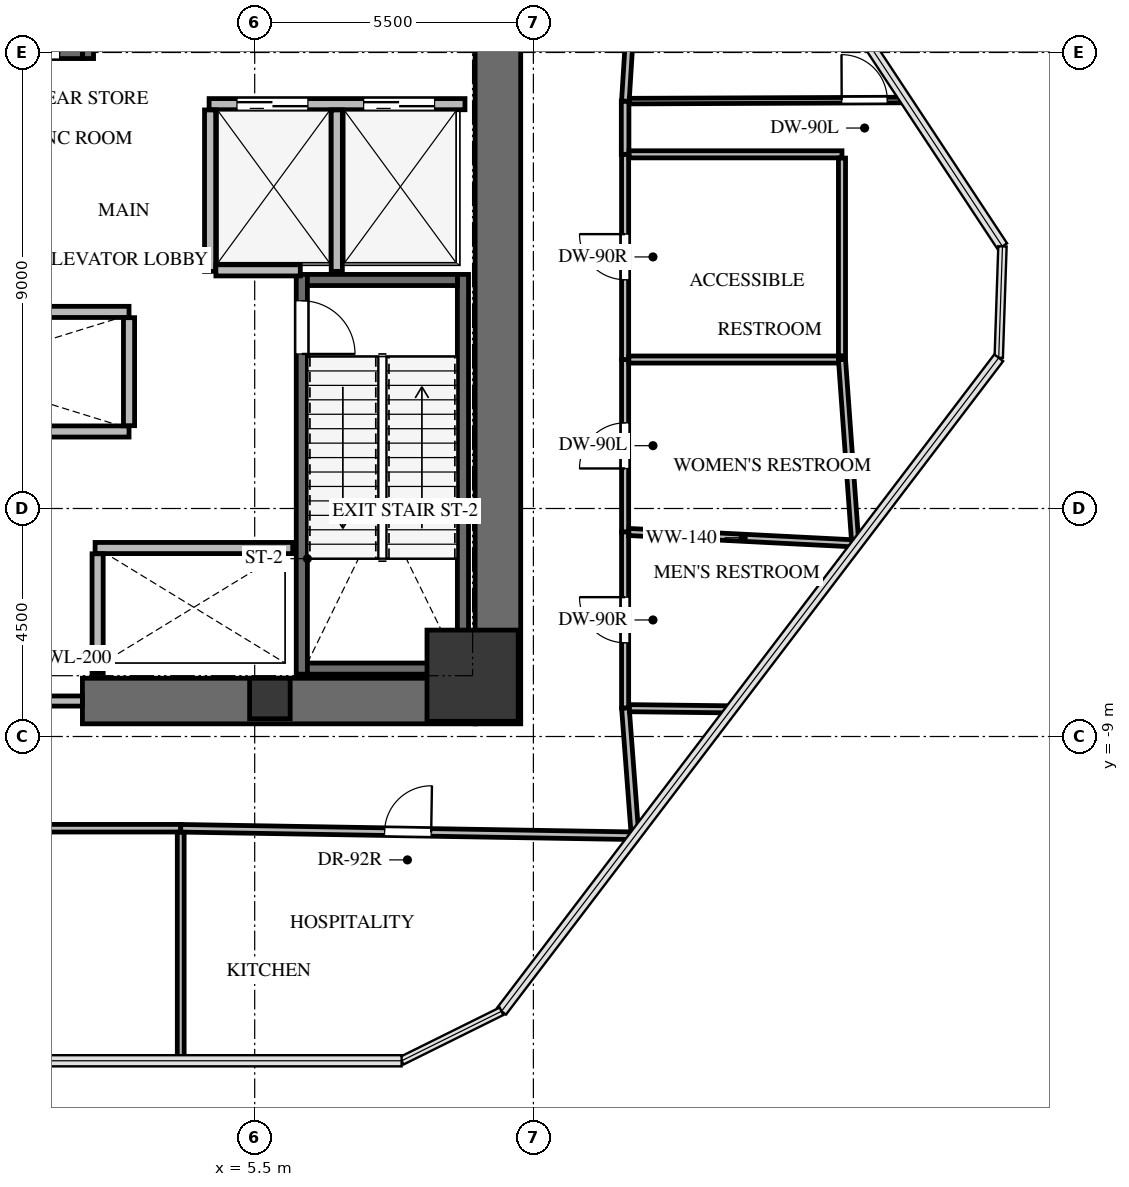
"""IFC4 building model, lengths in metres.
Left out: names, types, materials, properties, quantities, classifications, styles, units other than length and angle.
Written with IfcOpenShell. Run it as: python <this file> out.ifc"""

import sys

from ifc_helpers import new_model, si_unit, direction, frame, frame_2d, origin, origin_2d, place, context, subcontext, project, spatial, rectangle, extrude, source, transform, mapped, element, fill, save


model = new_model("IFC4")
c1 = context("Model", 3, precision=1e-05, world=origin(), true_north=direction((0.0, 1.0)))
c2 = subcontext(c1, "Body", "Model", "MODEL_VIEW")
j1 = project(units=[si_unit("LENGTHUNIT", "METRE"), si_unit("PLANEANGLEUNIT", "RADIAN")], contexts=[c1])
p1 = place(None, origin())
s1 = spatial("IfcSite", under=j1, at=p1, CompositionType="ELEMENT")
p2 = place(p1, origin())
s2 = spatial("IfcBuilding", under=s1, at=p2, CompositionType="ELEMENT")
p3 = place(p2, frame((0.0, 0.0, 5.2)))
s3 = spatial("IfcBuildingStorey", under=s2, at=p3, CompositionType="ELEMENT", Elevation=5.2)
p4 = place(p3, frame((10.3, -8.75, 0.0), z_axis=(0.0, 0.0, 1.0), x_axis=(0.0, 1.0, 0.0)))
e1 = element("IfcWall", 1, at=p4, inside=s3, PredefinedType="SHEAR", context=c2, shape_type="SweptSolid", body=[
    extrude(rectangle(XDim=17.5, YDim=0.9, at=frame_2d((8.75, 0.0))), origin(), (0.0, 0.0, 1.0), 5.2),
])
p5 = place(p3, frame((2.1, -8.3, 0.0), z_axis=(0.0, 0.0, 1.0), x_axis=(1.0, 0.0, 0.0)))
e2 = element("IfcWall", 2, at=p5, inside=s3, PredefinedType="SHEAR", context=c2, shape_type="SweptSolid", body=[
    extrude(rectangle(XDim=7.75, YDim=0.9, at=frame_2d((3.875, 0.0))), origin(), (0.0, 0.0, 1.0), 5.2),
])
p6 = place(p3, frame((9.61, -7.77, -0.3), z_axis=(0.0, 0.0, 1.0), x_axis=(0.0, 1.0, 0.0)))
e3 = element("IfcWall", 3, at=p6, inside=s3, PredefinedType="SHEAR", context=c2, shape_type="SweptSolid", body=[
    extrude(rectangle(XDim=7.89, YDim=0.22, at=frame_2d((3.945, 0.0))), origin(), (0.0, 0.0, 1.0), 5.15),
])
p7 = place(p3, frame((6.43, 0.12, -0.3), z_axis=(0.0, 0.0, 1.0), x_axis=(0.0, -1.0, 0.0)))
e4 = element("IfcWall", 4, at=p7, inside=s3, PredefinedType="SHEAR", context=c2, shape_type="SweptSolid", body=[
    extrude(rectangle(XDim=7.89, YDim=0.22, at=frame_2d((3.945, 0.0))), origin(), (0.0, 0.0, 1.0), 5.15),
])
p8 = place(p7, frame((0.52, 0.0, 0.0)))
e5 = element("IfcOpeningElement", 5, at=p8, cuts=e4, PredefinedType="OPENING", context=c2, shape_type="SweptSolid", body=[
    extrude(rectangle(XDim=1.05, YDim=2.15, at=frame_2d((0.525, 1.075))), frame((0.0, 0.12, 0.0), z_axis=(0.0, -1.0, 0.0), x_axis=(1.0, 0.0, 0.0)), (0.0, 0.0, 1.0), 0.24),
])
for number, where, z_axis, x_axis in (
    (6, (6.54, -7.66, -0.3), (0.0, 0.0, 1.0), (1.0, 0.0, 0.0)),
    (7, (9.5, 0.01, -0.3), (0.0, 0.0, 1.0), (-1.0, 0.0, 0.0)),
):
    element("IfcWall", number, at=place(p3, frame(where, z_axis=z_axis, x_axis=x_axis)), inside=s3, PredefinedType="SHEAR", context=c2, shape_type="SweptSolid", body=[
        extrude(rectangle(XDim=2.96, YDim=0.22, at=frame_2d((1.48, 0.0))), origin(), (0.0, 0.0, 1.0), 5.15),
    ])
p9 = place(p3, frame((2.21, 4.38, -0.3), z_axis=(0.0, 0.0, 1.0), x_axis=(0.0, 1.0, 0.0)))
e8 = element("IfcWall", 8, at=p9, inside=s3, PredefinedType="SHEAR", context=c2, shape_type="SweptSolid", body=[
    extrude(rectangle(XDim=3.4, YDim=0.22, at=frame_2d((1.7, 0.0))), origin(), (0.0, 0.0, 1.0), 5.15),
])
p10 = place(p3, frame((-5.25, 4.49, -0.3), z_axis=(0.0, 0.0, 1.0), x_axis=(1.0, 0.0, 0.0)))
e9 = element("IfcWall", 9, at=p10, inside=s3, PredefinedType="SHEAR", context=c2, shape_type="SweptSolid", body=[
    extrude(rectangle(XDim=7.35, YDim=0.22, at=frame_2d((3.675, 0.0))), origin(), (0.0, 0.0, 1.0), 5.15),
])
p11 = place(p10, frame((5.85, 0.0, 0.0)))
e10 = element("IfcOpeningElement", 10, at=p11, cuts=e9, PredefinedType="OPENING", context=c2, shape_type="SweptSolid", body=[
    extrude(rectangle(XDim=1.05, YDim=2.15, at=frame_2d((0.525, 1.075))), frame((0.0, 0.12, 0.0), z_axis=(0.0, -1.0, 0.0), x_axis=(1.0, 0.0, 0.0)), (0.0, 0.0, 1.0), 0.24),
])
m1 = source(origin(), c2, "Body", "SweptSolid", [
    extrude(rectangle(XDim=1.8, YDim=1.8, at=origin_2d()), origin(), (0.0, 0.0, 1.0), 5.15),
])
p12 = place(p3, frame((9.8, -7.8, -0.3), z_axis=(0.0, 0.0, 1.0), x_axis=(1.0, 0.0, 0.0)))
e11 = element("IfcColumn", 11, at=p12, inside=s3, PredefinedType="COLUMN", context=c2, shape_type="MappedRepresentation", body=[
    mapped(m1, transform((0.0, 0.0, 0.0), x_axis=(1.0, 0.0, 0.0), y_axis=(0.0, 1.0, 0.0), z_axis=(0.0, 0.0, 1.0), scale=1.0)),
])
m2 = source(origin(), c2, "Body", "SweptSolid", [
    extrude(rectangle(XDim=0.8, YDim=0.8, at=origin_2d()), origin(), (0.0, 0.0, 1.0), 5.15),
])
p13 = place(p3, frame((5.8, -8.25, -0.3), z_axis=(0.0, 0.0, 1.0), x_axis=(1.0, 0.0, 0.0)))
e12 = element("IfcColumn", 12, at=p13, inside=s3, PredefinedType="PILASTER", context=c2, shape_type="MappedRepresentation", body=[
    mapped(m2, transform((0.0, 0.0, 0.0), x_axis=(1.0, 0.0, 0.0), y_axis=(0.0, 1.0, 0.0), z_axis=(0.0, 0.0, 1.0), scale=1.0)),
])
p14 = place(p3, frame((-2.1, -8.3, 0.0), z_axis=(0.0, 0.0, 1.0), x_axis=(1.0, 0.0, 0.0)))
e13 = element("IfcWall", 13, at=p14, inside=s3, PredefinedType="SOLIDWALL", context=c2, shape_type="SweptSolid", body=[
    extrude(rectangle(XDim=4.2, YDim=0.2, at=frame_2d((2.1, 0.0))), origin(), (0.0, 0.0, 1.0), 4.835),
])
p15 = place(p14, frame((1.2, 0.0, 0.0)))
e14 = element("IfcOpeningElement", 14, at=p15, cuts=e13, PredefinedType="OPENING", context=c2, shape_type="SweptSolid", body=[
    extrude(rectangle(XDim=1.8, YDim=2.15, at=frame_2d((0.9, 1.075))), frame((0.0, 0.11, 0.0), z_axis=(0.0, -1.0, 0.0), x_axis=(1.0, 0.0, 0.0)), (0.0, 0.0, 1.0), 0.22),
])
p16 = place(p3, frame((4.6, 3.48, 0.0), z_axis=(0.0, 0.0, 1.0), x_axis=(1.0, 0.0, 0.0)))
e15 = element("IfcWall", 15, at=p16, inside=s3, PredefinedType="SOLIDWALL", context=c2, shape_type="SweptSolid", body=[
    extrude(rectangle(XDim=5.05, YDim=0.22, at=frame_2d((2.525, 0.0))), origin(), (0.0, 0.0, 1.0), 4.835),
])
p17 = place(p16, frame((0.55, 0.0, 0.0)))
e16 = element("IfcOpeningElement", 16, at=p17, cuts=e15, PredefinedType="OPENING", context=c2, shape_type="SweptSolid", body=[
    extrude(rectangle(XDim=1.4, YDim=2.15, at=frame_2d((0.7, 1.075))), frame((0.0, 0.12, 0.0), z_axis=(0.0, -1.0, 0.0), x_axis=(1.0, 0.0, 0.0)), (0.0, 0.0, 1.0), 0.24),
])
p18 = place(p16, frame((3.05, 0.0, 0.0)))
e17 = element("IfcOpeningElement", 17, at=p18, cuts=e15, PredefinedType="OPENING", context=c2, shape_type="SweptSolid", body=[
    extrude(rectangle(XDim=1.4, YDim=2.15, at=frame_2d((0.7, 1.075))), frame((0.0, 0.12, 0.0), z_axis=(0.0, -1.0, 0.0), x_axis=(1.0, 0.0, 0.0)), (0.0, 0.0, 1.0), 0.24),
])
for number, where, z_axis, x_axis in (
    (18, (4.62, 0.18, 0.0), (0.0, 0.0, 1.0), (0.0, 1.0, 0.0)),
    (19, (7.12, 0.18, 0.0), (0.0, 0.0, 1.0), (0.0, 1.0, 0.0)),
):
    element("IfcWall", number, at=place(p3, frame(where, z_axis=z_axis, x_axis=x_axis)), inside=s3, PredefinedType="SOLIDWALL", context=c2, shape_type="SweptSolid", body=[
        extrude(rectangle(XDim=3.186, YDim=0.22, at=frame_2d((1.593, 0.0))), origin(), (0.0, 0.0, 1.0), 4.835),
    ])
p19 = place(p3, frame((4.734, 0.2, 0.0), z_axis=(0.0, 0.0, 1.0), x_axis=(1.0, 0.0, 0.0)))
e20 = element("IfcWall", 20, at=p19, inside=s3, PredefinedType="SOLIDWALL", context=c2, shape_type="SweptSolid", body=[
    extrude(rectangle(XDim=1.666, YDim=0.22, at=frame_2d((0.833, 0.0))), origin(), (0.0, 0.0, 1.0), 4.835),
])
p20 = place(p3, frame((2.35, -5.28, 0.0), z_axis=(0.0, 0.0, 1.0), x_axis=(1.0, 0.0, 0.0)))
e21 = element("IfcWall", 21, at=p20, inside=s3, PredefinedType="SOLIDWALL", context=c2, shape_type="SweptSolid", body=[
    extrude(rectangle(XDim=3.9, YDim=0.22, at=frame_2d((1.95, 0.0))), origin(), (0.0, 0.0, 1.0), 4.835),
])
p21 = place(p3, frame((2.4, -7.75, 0.0), z_axis=(0.0, 0.0, 1.0), x_axis=(0.0, 1.0, 0.0)))
e22 = element("IfcWall", 22, at=p21, inside=s3, PredefinedType="SOLIDWALL", context=c2, shape_type="SweptSolid", body=[
    extrude(rectangle(XDim=2.356, YDim=0.22, at=frame_2d((1.178, 0.0))), origin(), (0.0, 0.0, 1.0), 4.835),
])
for number, where, z_axis, x_axis in (
    (23, (-4.22, -2.98, 0.0), (0.0, 0.0, 1.0), (1.0, 0.0, 0.0)),
    (24, (-4.22, -0.62, 0.0), (0.0, 0.0, 1.0), (1.0, 0.0, 0.0)),
):
    element("IfcWall", number, at=place(p3, frame(where, z_axis=z_axis, x_axis=x_axis)), inside=s3, PredefinedType="SOLIDWALL", context=c2, shape_type="SweptSolid", body=[
        extrude(rectangle(XDim=7.24, YDim=0.22, at=frame_2d((3.62, 0.0))), origin(), (0.0, 0.0, 1.0), 4.835),
    ])
p22 = place(p3, frame((3.02, -2.866, 0.0), z_axis=(0.0, 0.0, 1.0), x_axis=(0.0, 1.0, 0.0)))
e25 = element("IfcWall", 25, at=p22, inside=s3, PredefinedType="SOLIDWALL", context=c2, shape_type="SweptSolid", body=[
    extrude(rectangle(XDim=2.132, YDim=0.22, at=frame_2d((1.066, 0.0))), origin(), (0.0, 0.0, 1.0), 4.835),
])
p23 = place(p3, frame((12.81, -8.44, 0.0), z_axis=(0.0, 0.0, 1.0), x_axis=(0.0, 1.0, 0.0)))
e26 = element("IfcWall", 26, at=p23, inside=s3, PredefinedType="PARTITIONING", context=c2, shape_type="SweptSolid", body=[
    extrude(rectangle(XDim=3.48, YDim=0.14, at=frame_2d((1.74, 0.0))), origin(), (0.0, 0.0, 1.0), 4.835),
])
p24 = place(p23, frame((1.29, 0.0, 0.0)))
e27 = element("IfcOpeningElement", 27, at=p24, cuts=e26, PredefinedType="OPENING", context=c2, shape_type="SweptSolid", body=[
    extrude(rectangle(XDim=0.9, YDim=2.05, at=frame_2d((0.45, 1.025))), frame((0.0, 0.08, 0.0), z_axis=(0.0, -1.0, 0.0), x_axis=(1.0, 0.0, 0.0)), (0.0, 0.0, 1.0), 0.16),
])
p25 = place(p3, frame((12.81, -4.96, 0.0), z_axis=(0.0, 0.0, 1.0), x_axis=(0.0, 1.0, 0.0)))
e28 = element("IfcWall", 28, at=p25, inside=s3, PredefinedType="PARTITIONING", context=c2, shape_type="SweptSolid", body=[
    extrude(rectangle(XDim=3.4, YDim=0.14, at=frame_2d((1.7, 0.0))), origin(), (0.0, 0.0, 1.0), 3.757),
])
p26 = place(p25, frame((1.25, 0.0, 0.0)))
e29 = element("IfcOpeningElement", 29, at=p26, cuts=e28, PredefinedType="OPENING", context=c2, shape_type="SweptSolid", body=[
    extrude(rectangle(XDim=0.9, YDim=2.05, at=frame_2d((0.45, 1.025))), frame((0.0, 0.08, 0.0), z_axis=(0.0, -1.0, 0.0), x_axis=(1.0, 0.0, 0.0)), (0.0, 0.0, 1.0), 0.16),
])
p27 = place(p3, frame((12.81, -1.56, 0.0), z_axis=(0.0, 0.0, 1.0), x_axis=(0.0, 1.0, 0.0)))
e30 = element("IfcWall", 30, at=p27, inside=s3, PredefinedType="PARTITIONING", context=c2, shape_type="SweptSolid", body=[
    extrude(rectangle(XDim=4.05, YDim=0.14, at=frame_2d((2.025, 0.0))), origin(), (0.0, 0.0, 1.0), 3.757),
])
p28 = place(p27, frame((1.575, 0.0, 0.0)))
e31 = element("IfcOpeningElement", 31, at=p28, cuts=e30, PredefinedType="OPENING", context=c2, shape_type="SweptSolid", body=[
    extrude(rectangle(XDim=0.9, YDim=2.05, at=frame_2d((0.45, 1.025))), frame((0.0, 0.08, 0.0), z_axis=(0.0, -1.0, 0.0), x_axis=(1.0, 0.0, 0.0)), (0.0, 0.0, 1.0), 0.16),
])
p29 = place(p3, frame((-5.96, -10.81, 0.0), z_axis=(0.0, 0.0, 1.0), x_axis=(1.0, 0.0, 0.0)))
e32 = element("IfcWall", 32, at=p29, inside=s3, PredefinedType="PARTITIONING", context=c2, shape_type="SweptSolid", body=[
    extrude(rectangle(XDim=10.0, YDim=0.15, at=frame_2d((5.0, 0.0))), origin(), (0.0, 0.0, 1.0), 3.757),
])
p30 = place(p29, frame((4.525, 0.0, 0.0)))
e33 = element("IfcOpeningElement", 33, at=p30, cuts=e32, PredefinedType="OPENING", context=c2, shape_type="SweptSolid", body=[
    extrude(rectangle(XDim=0.95, YDim=2.1, at=frame_2d((0.475, 1.05))), frame((0.0, 0.085, 0.0), z_axis=(0.0, -1.0, 0.0), x_axis=(1.0, 0.0, 0.0)), (0.0, 0.0, 1.0), 0.17),
])
p31 = place(p3, frame((4.04, -10.811, 0.0), z_axis=(0.0, 0.0, 1.0), x_axis=(0.999863885947, -0.016498775082, 0.0)))
e34 = element("IfcWall", 34, at=p31, inside=s3, PredefinedType="PARTITIONING", context=c2, shape_type="SweptSolid", body=[
    extrude(rectangle(XDim=8.967, YDim=0.15, at=frame_2d((4.484, 0.0))), origin(), (0.0, 0.0, 1.0), 3.757),
])
p32 = place(p31, frame((4.024, 0.0, 0.0)))
e35 = element("IfcOpeningElement", 35, at=p32, cuts=e34, PredefinedType="OPENING", context=c2, shape_type="SweptSolid", body=[
    extrude(rectangle(XDim=0.92, YDim=2.1, at=frame_2d((0.46, 1.05))), frame((0.0, 0.085, 0.0), z_axis=(0.0, -1.0, 0.0), x_axis=(1.0, 0.0, 0.0)), (0.0, 0.0, 1.0), 0.17),
])
p33 = place(p3, frame((13.0, -10.88, 0.0), z_axis=(0.0, 0.0, 1.0), x_axis=(-0.075223978352, 0.99716666264, 0.0)))
e36 = element("IfcWall", 36, at=p33, inside=s3, PredefinedType="PARTITIONING", context=c2, shape_type="SweptSolid", body=[
    extrude(rectangle(XDim=2.447, YDim=0.15, at=frame_2d((1.224, 0.0))), origin(), (0.0, 0.0, 1.0), 4.835),
])
p34 = place(p3, frame((12.81, 2.49, 0.0), z_axis=(0.0, 0.0, 1.0), x_axis=(0.0, 1.0, 0.0)))
e37 = element("IfcWall", 37, at=p34, inside=s3, PredefinedType="PARTITIONING", context=c2, shape_type="SweptSolid", body=[
    extrude(rectangle(XDim=1.05, YDim=0.15, at=frame_2d((0.525, 0.0))), origin(), (0.0, 0.0, 1.0), 4.835),
])
p35 = place(p3, frame((12.815, 3.54, 0.0), z_axis=(0.0, 0.0, 1.0), x_axis=(0.062817309995, 0.998025042554, 0.0)))
e38 = element("IfcWall", 38, at=p35, inside=s3, PredefinedType="PARTITIONING", context=c2, shape_type="SweptSolid", body=[
    extrude(rectangle(XDim=7.513, YDim=0.15, at=frame_2d((3.756, 0.0))), origin(), (0.0, 0.0, 1.0), 4.835),
])
p36 = place(p35, frame((3.296, 0.0, 0.0)))
e39 = element("IfcOpeningElement", 39, at=p36, cuts=e38, PredefinedType="OPENING", context=c2, shape_type="SweptSolid", body=[
    extrude(rectangle(XDim=0.92, YDim=2.1, at=frame_2d((0.46, 1.05))), frame((0.0, 0.085, 0.0), z_axis=(0.0, -1.0, 0.0), x_axis=(1.0, 0.0, 0.0)), (0.0, 0.0, 1.0), 0.17),
])
p37 = place(p3, frame((12.884, -4.964, 0.0), z_axis=(0.0, 0.0, 1.0), x_axis=(0.998724412401, -0.050493049755, 0.0)))
e40 = element("IfcWall", 40, at=p37, inside=s3, PredefinedType="PARTITIONING", context=c2, shape_type="SweptSolid", body=[
    extrude(rectangle(XDim=4.516, YDim=0.14, at=frame_2d((2.258, 0.0))), origin(), (0.0, 0.0, 1.0), 4.835),
])
p38 = place(p3, frame((14.904, -8.464, 0.0), z_axis=(0.0, 0.0, 1.0), x_axis=(-0.999933368486, 0.011543768381, 0.0)))
e41 = element("IfcWall", 41, at=p38, inside=s3, PredefinedType="PARTITIONING", context=c2, shape_type="SweptSolid", body=[
    extrude(rectangle(XDim=2.009, YDim=0.14, at=frame_2d((1.005, 0.0))), origin(), (0.0, 0.0, 1.0), 4.835),
])
p39 = place(p3, frame((17.34, -5.263, 0.0), z_axis=(0.0, 0.0, 1.0), x_axis=(-0.605512507053, -0.795835789471, 0.0)))
e42 = element("IfcWall", 42, at=p39, inside=s3, PredefinedType="PARTITIONING", context=c2, shape_type="SweptSolid", body=[
    extrude(rectangle(XDim=0.36, YDim=0.14, at=frame_2d((0.18, 0.0))), origin(), (0.0, 0.0, 1.0), 4.835),
])
p40 = place(p3, frame((12.884, -1.56, 0.0), z_axis=(0.0, 0.0, 1.0), x_axis=(1.0, 0.0, 0.0)))
e43 = element("IfcWall", 43, at=p40, inside=s3, PredefinedType="PARTITIONING", context=c2, shape_type="SweptSolid", body=[
    extrude(rectangle(XDim=4.206, YDim=0.14, at=frame_2d((2.103, 0.0))), origin(), (0.0, 0.0, 1.0), 4.835),
])
p41 = place(p3, frame((17.09, -1.56, 0.0), z_axis=(0.0, 0.0, 1.0), x_axis=(0.071991819851, -0.997405222502, 0.0)))
e44 = element("IfcWall", 44, at=p41, inside=s3, PredefinedType="PARTITIONING", context=c2, shape_type="SweptSolid", body=[
    extrude(rectangle(XDim=3.564, YDim=0.14, at=frame_2d((1.782, 0.0))), origin(), (0.0, 0.0, 1.0), 3.757),
])
p42 = place(p3, frame((12.889, 2.49, 0.0), z_axis=(0.0, 0.0, 1.0), x_axis=(1.0, 0.0, 0.0)))
e45 = element("IfcWall", 45, at=p42, inside=s3, PredefinedType="PARTITIONING", context=c2, shape_type="SweptSolid", body=[
    extrude(rectangle(XDim=4.201, YDim=0.14, at=frame_2d((2.101, 0.0))), origin(), (0.0, 0.0, 1.0), 4.835),
])
p43 = place(p3, frame((17.09, 2.416, 0.0), z_axis=(0.0, 0.0, 1.0), x_axis=(0.0, -1.0, 0.0)))
e46 = element("IfcWall", 46, at=p43, inside=s3, PredefinedType="PARTITIONING", context=c2, shape_type="SweptSolid", body=[
    extrude(rectangle(XDim=3.902, YDim=0.14, at=frame_2d((1.951, 0.0))), origin(), (0.0, 0.0, 1.0), 3.757),
])
p44 = place(p3, frame((4.04, -10.89, 0.0), z_axis=(0.0, 0.0, 1.0), x_axis=(0.0, -1.0, 0.0)))
e47 = element("IfcWall", 47, at=p44, inside=s3, PredefinedType="PARTITIONING", context=c2, shape_type="SweptSolid", body=[
    extrude(rectangle(XDim=4.51, YDim=0.135, at=frame_2d((2.255, 0.0))), origin(), (0.0, 0.0, 1.0), 4.835),
])
p45 = place(p3, frame((12.894, 3.54, 0.0), z_axis=(0.0, 0.0, 1.0), x_axis=(0.999992066554, 0.003983318888, 0.0)))
e48 = element("IfcWall", 48, at=p45, inside=s3, PredefinedType="MOVABLE", context=c2, shape_type="SweptSolid", body=[
    extrude(rectangle(XDim=5.455, YDim=0.11, at=frame_2d((2.728, 0.0))), origin(), (0.0, 0.0, 1.0), 4.835),
])
p46 = place(p45, frame((4.19, 0.0, 0.0)))
e49 = element("IfcOpeningElement", 49, at=p46, cuts=e48, PredefinedType="OPENING", context=c2, shape_type="SweptSolid", body=[
    extrude(rectangle(XDim=0.9, YDim=2.05, at=frame_2d((0.45, 1.025))), frame((0.0, 0.065, 0.0), z_axis=(0.0, -1.0, 0.0), x_axis=(1.0, 0.0, 0.0)), (0.0, 0.0, 1.0), 0.13),
])
m3 = source(origin(), c2, "Body", "SweptSolid", [
    extrude(rectangle(XDim=1.05, YDim=2.15, at=frame_2d((0.525, 1.075))), frame((0.0, 0.025, 0.0), z_axis=(0.0, -1.0, 0.0), x_axis=(1.0, 0.0, 0.0)), (0.0, 0.0, 1.0), 0.05),
])
p47 = place(p8, origin())
e50 = element("IfcDoor", 50, at=p47, inside=s3, OperationType="SINGLE_SWING_RIGHT", PredefinedType="DOOR", context=c2, shape_type="MappedRepresentation", body=[
    mapped(m3, transform((0.0, 0.0, 0.0), x_axis=(1.0, 0.0, 0.0), y_axis=(0.0, 1.0, 0.0), z_axis=(0.0, 0.0, 1.0), scale=1.0)),
])
fill(e5, e50)
m4 = source(origin(), c2, "Body", "SweptSolid", [
    extrude(rectangle(XDim=1.05, YDim=2.15, at=frame_2d((0.525, 1.075))), frame((0.0, 0.025, 0.0), z_axis=(0.0, -1.0, 0.0), x_axis=(1.0, 0.0, 0.0)), (0.0, 0.0, 1.0), 0.05),
])
p48 = place(p11, origin())
e51 = element("IfcDoor", 51, at=p48, inside=s3, OperationType="SINGLE_SWING_LEFT", PredefinedType="DOOR", context=c2, shape_type="MappedRepresentation", body=[
    mapped(m4, transform((0.0, 0.0, 0.0), x_axis=(1.0, 0.0, 0.0), y_axis=(0.0, 1.0, 0.0), z_axis=(0.0, 0.0, 1.0), scale=1.0)),
])
fill(e10, e51)
m5 = source(origin(), c2, "Body", "SweptSolid", [
    extrude(rectangle(XDim=1.4, YDim=2.15, at=frame_2d((0.7, 1.075))), frame((0.0, 0.025, 0.0), z_axis=(0.0, -1.0, 0.0), x_axis=(1.0, 0.0, 0.0)), (0.0, 0.0, 1.0), 0.05),
])
p49 = place(p17, origin())
e52 = element("IfcDoor", 52, at=p49, inside=s3, OperationType="DOUBLE_DOOR_SLIDING", PredefinedType="DOOR", context=c2, shape_type="MappedRepresentation", body=[
    mapped(m5, transform((0.0, 0.0, 0.0), x_axis=(1.0, 0.0, 0.0), y_axis=(0.0, 1.0, 0.0), z_axis=(0.0, 0.0, 1.0), scale=1.0)),
])
fill(e16, e52)
p50 = place(p18, origin())
e53 = element("IfcDoor", 53, at=p50, inside=s3, OperationType="DOUBLE_DOOR_SLIDING", PredefinedType="DOOR", context=c2, shape_type="MappedRepresentation", body=[
    mapped(m5, transform((0.0, 0.0, 0.0), x_axis=(1.0, 0.0, 0.0), y_axis=(0.0, 1.0, 0.0), z_axis=(0.0, 0.0, 1.0), scale=1.0)),
])
fill(e17, e53)
m6 = source(origin(), c2, "Body", "SweptSolid", [
    extrude(rectangle(XDim=0.9, YDim=2.05, at=frame_2d((0.45, 1.025))), frame((0.0, 0.025, 0.0), z_axis=(0.0, -1.0, 0.0), x_axis=(1.0, 0.0, 0.0)), (0.0, 0.0, 1.0), 0.05),
])
p51 = place(p24, origin())
e54 = element("IfcDoor", 54, at=p51, inside=s3, OperationType="SINGLE_SWING_RIGHT", PredefinedType="DOOR", context=c2, shape_type="MappedRepresentation", body=[
    mapped(m6, transform((0.0, 0.0, 0.0), x_axis=(1.0, 0.0, 0.0), y_axis=(0.0, 1.0, 0.0), z_axis=(0.0, 0.0, 1.0), scale=1.0)),
])
fill(e27, e54)
m7 = source(origin(), c2, "Body", "SweptSolid", [
    extrude(rectangle(XDim=0.9, YDim=2.05, at=frame_2d((0.45, 1.025))), frame((0.0, 0.025, 0.0), z_axis=(0.0, -1.0, 0.0), x_axis=(1.0, 0.0, 0.0)), (0.0, 0.0, 1.0), 0.05),
])
p52 = place(p26, origin())
e55 = element("IfcDoor", 55, at=p52, inside=s3, OperationType="SINGLE_SWING_LEFT", PredefinedType="DOOR", context=c2, shape_type="MappedRepresentation", body=[
    mapped(m7, transform((0.0, 0.0, 0.0), x_axis=(1.0, 0.0, 0.0), y_axis=(0.0, 1.0, 0.0), z_axis=(0.0, 0.0, 1.0), scale=1.0)),
])
fill(e29, e55)
p53 = place(p28, origin())
e56 = element("IfcDoor", 56, at=p53, inside=s3, OperationType="SINGLE_SWING_RIGHT", PredefinedType="DOOR", context=c2, shape_type="MappedRepresentation", body=[
    mapped(m6, transform((0.0, 0.0, 0.0), x_axis=(1.0, 0.0, 0.0), y_axis=(0.0, 1.0, 0.0), z_axis=(0.0, 0.0, 1.0), scale=1.0)),
])
fill(e31, e56)
m8 = source(origin(), c2, "Body", "SweptSolid", [
    extrude(rectangle(XDim=0.92, YDim=2.1, at=frame_2d((0.46, 1.05))), frame((0.0, 0.025, 0.0), z_axis=(0.0, -1.0, 0.0), x_axis=(1.0, 0.0, 0.0)), (0.0, 0.0, 1.0), 0.05),
])
p54 = place(p32, origin())
e57 = element("IfcDoor", 57, at=p54, inside=s3, OperationType="SINGLE_SWING_RIGHT", PredefinedType="DOOR", context=c2, shape_type="MappedRepresentation", body=[
    mapped(m8, transform((0.0, 0.0, 0.0), x_axis=(1.0, 0.0, 0.0), y_axis=(0.0, 1.0, 0.0), z_axis=(0.0, 0.0, 1.0), scale=1.0)),
])
fill(e35, e57)
p55 = place(p46, origin())
e58 = element("IfcDoor", 58, at=p55, inside=s3, OperationType="SINGLE_SWING_LEFT", PredefinedType="DOOR", context=c2, shape_type="MappedRepresentation", body=[
    mapped(m7, transform((0.0, 0.0, 0.0), x_axis=(1.0, 0.0, 0.0), y_axis=(0.0, 1.0, 0.0), z_axis=(0.0, 0.0, 1.0), scale=1.0)),
])
fill(e49, e58)
save(model, sys.argv[1])
